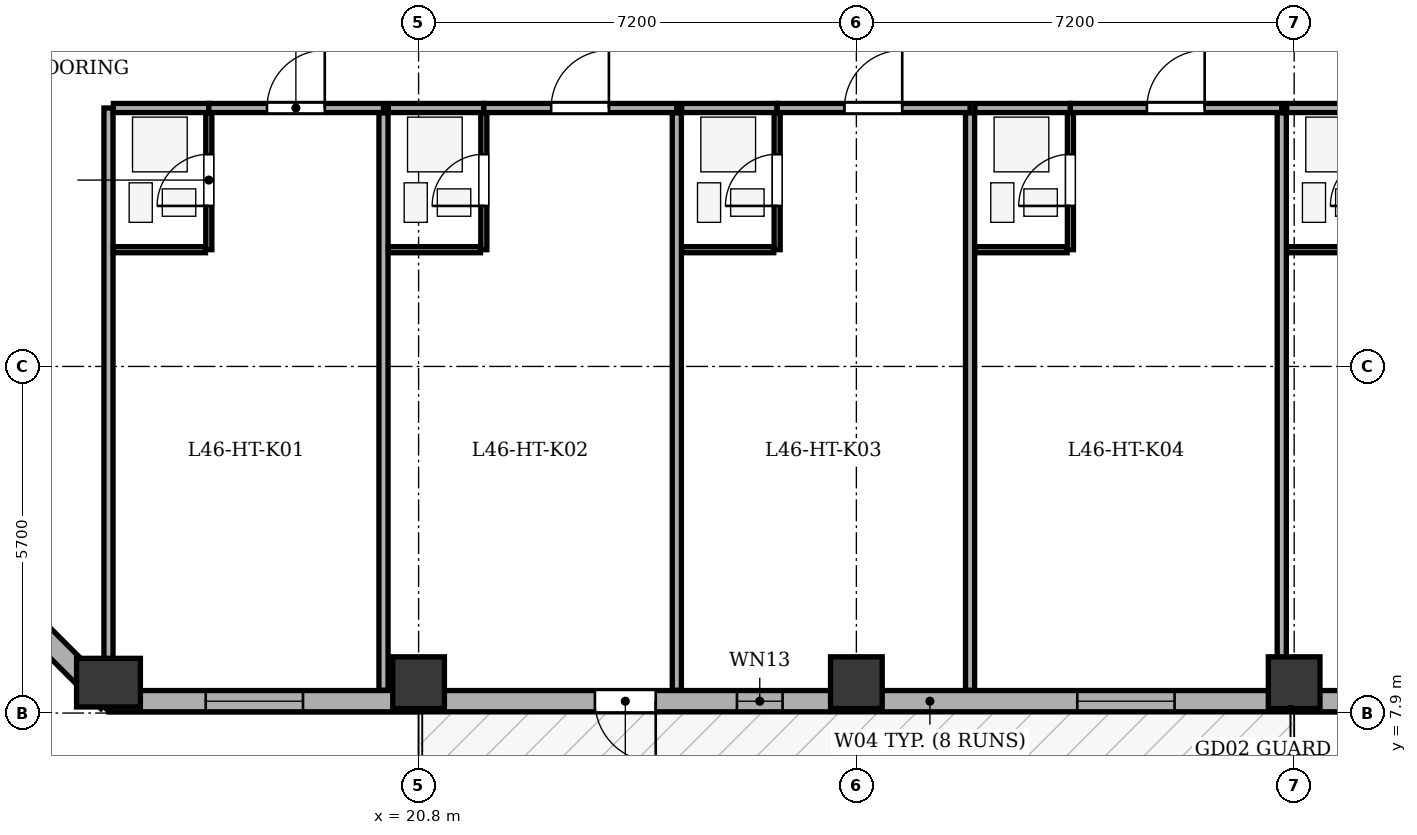
"""IFC4 building model, lengths in metres.
Left out: names, types, materials, properties, quantities, classifications, styles, units other than length and angle.
Written with IfcOpenShell. Run it as: python <this file> out.ifc"""

import sys

from ifc_helpers import new_model, si_unit, direction, frame, frame_2d, origin, origin_2d, place, context, subcontext, project, spatial, rectangle, extrude, element, fill, save


model = new_model("IFC4")
c1 = context("Model", 3, precision=1e-05, world=origin(), true_north=direction((0.0, 1.0)))
c2 = subcontext(c1, "Body", "Model", "MODEL_VIEW")
j1 = project(units=[si_unit("LENGTHUNIT", "METRE"), si_unit("PLANEANGLEUNIT", "RADIAN")], contexts=[c1])
p1 = place(None, origin())
s1 = spatial("IfcSite", under=j1, at=p1, CompositionType="ELEMENT")
p2 = place(p1, origin())
s2 = spatial("IfcBuilding", under=s1, at=p2, CompositionType="ELEMENT")
p3 = place(p2, frame((0.0, 0.0, 179.8)))
s3 = spatial("IfcBuildingStorey", under=s2, at=p3, CompositionType="ELEMENT", Elevation=179.8)
p4 = place(p3, frame((15.7, 8.4, 0.0), z_axis=(0.0, 0.0, 1.0), x_axis=(1.0, 0.0, 0.0)))
e1 = element("IfcColumn", 1, at=p4, inside=s3, PredefinedType="COLUMN", context=c2, shape_type="SweptSolid", body=[
    extrude(rectangle(XDim=0.8, YDim=1.05, at=origin_2d()), origin(), (0.0, 0.0, 1.0), 3.5),
])
for number, where, z_axis, x_axis in (
    (2, (20.8, 8.4, 0.0), (0.0, 0.0, 1.0), (1.0, 0.0, 0.0)),
    (3, (28.0, 8.4, 0.0), (0.0, 0.0, 1.0), (1.0, 0.0, 0.0)),
    (4, (35.2, 8.4, 0.0), (0.0, 0.0, 1.0), (1.0, 0.0, 0.0)),
):
    element("IfcColumn", number, at=place(p3, frame(where, z_axis=z_axis, x_axis=x_axis)), inside=s3, PredefinedType="COLUMN", context=c2, shape_type="SweptSolid", body=[
        extrude(rectangle(XDim=0.85, YDim=0.85, at=origin_2d()), origin(), (0.0, 0.0, 1.0), 3.5),
    ])
p5 = place(p3, frame((50.7, 8.095, 0.0), z_axis=(0.0, 0.0, 1.0), x_axis=(-1.0, 0.0, 0.0)))
e5 = element("IfcWall", 5, at=p5, inside=s3, PredefinedType="STANDARD", context=c2, shape_type="SweptSolid", body=[
    extrude(rectangle(XDim=35.0, YDim=0.35, at=frame_2d((17.5, 0.0))), origin(), (0.0, 0.0, 1.0), 2.435),
])
p6 = place(p5, frame((26.0, 0.0, 0.0)))
e6 = element("IfcOpeningElement", 6, at=p6, cuts=e5, PredefinedType="OPENING", context=c2, shape_type="SweptSolid", body=[
    extrude(rectangle(XDim=1.0, YDim=2.02, at=frame_2d((0.5, 1.01))), frame((0.0, 0.185, 0.0), z_axis=(0.0, -1.0, 0.0), x_axis=(1.0, 0.0, 0.0)), (0.0, 0.0, 1.0), 0.37),
])
p7 = place(p5, frame((1.763, 0.0, 0.75)))
e7 = element("IfcOpeningElement", 7, at=p7, cuts=e5, PredefinedType="OPENING", context=c2, shape_type="SweptSolid", body=[
    extrude(rectangle(XDim=1.6, YDim=1.565, at=frame_2d((0.8, 0.782))), frame((0.0, 0.185, 0.0), z_axis=(0.0, -1.0, 0.0), x_axis=(1.0, 0.0, 0.0)), (0.0, 0.0, 1.0), 0.37),
])
p8 = place(p5, frame((7.564, 0.0, 0.75)))
e8 = element("IfcOpeningElement", 8, at=p8, cuts=e5, PredefinedType="OPENING", context=c2, shape_type="SweptSolid", body=[
    extrude(rectangle(XDim=1.6, YDim=1.565, at=frame_2d((0.8, 0.782))), frame((0.0, 0.185, 0.0), z_axis=(0.0, -1.0, 0.0), x_axis=(1.0, 0.0, 0.0)), (0.0, 0.0, 1.0), 0.37),
])
p9 = place(p5, frame((12.001, 0.0, 0.75)))
e9 = element("IfcOpeningElement", 9, at=p9, cuts=e5, PredefinedType="OPENING", context=c2, shape_type="SweptSolid", body=[
    extrude(rectangle(XDim=1.6, YDim=1.565, at=frame_2d((0.8, 0.782))), frame((0.0, 0.185, 0.0), z_axis=(0.0, -1.0, 0.0), x_axis=(1.0, 0.0, 0.0)), (0.0, 0.0, 1.0), 0.37),
])
p10 = place(p5, frame((17.467, 0.0, 0.75)))
e10 = element("IfcOpeningElement", 10, at=p10, cuts=e5, PredefinedType="OPENING", context=c2, shape_type="SweptSolid", body=[
    extrude(rectangle(XDim=1.6, YDim=1.565, at=frame_2d((0.8, 0.782))), frame((0.0, 0.185, 0.0), z_axis=(0.0, -1.0, 0.0), x_axis=(1.0, 0.0, 0.0)), (0.0, 0.0, 1.0), 0.37),
])
p11 = place(p5, frame((31.801, 0.0, 0.75)))
e11 = element("IfcOpeningElement", 11, at=p11, cuts=e5, PredefinedType="OPENING", context=c2, shape_type="SweptSolid", body=[
    extrude(rectangle(XDim=1.6, YDim=1.565, at=frame_2d((0.8, 0.782))), frame((0.0, 0.185, 0.0), z_axis=(0.0, -1.0, 0.0), x_axis=(1.0, 0.0, 0.0)), (0.0, 0.0, 1.0), 0.37),
])
p12 = place(p5, frame((23.914, 0.0, 0.75)))
e12 = element("IfcOpeningElement", 12, at=p12, cuts=e5, PredefinedType="OPENING", context=c2, shape_type="SweptSolid", body=[
    extrude(rectangle(XDim=0.75, YDim=1.45, at=frame_2d((0.375, 0.725))), frame((0.0, 0.185, 0.0), z_axis=(0.0, -1.0, 0.0), x_axis=(1.0, 0.0, 0.0)), (0.0, 0.0, 1.0), 0.37),
])
p13 = place(p3, frame((15.7, 8.095, 0.0), z_axis=(0.0, 0.0, 1.0), x_axis=(-0.707106781187, 0.707106781187, 0.0)))
e13 = element("IfcWall", 13, at=p13, inside=s3, PredefinedType="STANDARD", context=c2, shape_type="SweptSolid", body=[
    extrude(rectangle(XDim=6.795, YDim=0.35, at=frame_2d((3.397, 0.0))), origin(), (0.0, 0.0, 1.0), 2.435),
])
p14 = place(p13, frame((2.698, 0.0, 0.75)))
e14 = element("IfcOpeningElement", 14, at=p14, cuts=e13, PredefinedType="OPENING", context=c2, shape_type="SweptSolid", body=[
    extrude(rectangle(XDim=1.4, YDim=1.565, at=frame_2d((0.7, 0.782))), frame((0.0, 0.185, 0.0), z_axis=(0.0, -1.0, 0.0), x_axis=(1.0, 0.0, 0.0)), (0.0, 0.0, 1.0), 0.37),
])
p15 = place(p3, frame((15.7, 8.275, 0.0), z_axis=(0.0, 0.0, 1.0), x_axis=(0.0, 1.0, 0.0)))
e15 = element("IfcWall", 15, at=p15, inside=s3, PredefinedType="PARTITIONING", context=c2, shape_type="SweptSolid", body=[
    extrude(rectangle(XDim=9.575, YDim=0.15, at=frame_2d((4.788, 0.0))), origin(), (0.0, 0.0, 1.0), 3.05),
])
p16 = place(p3, frame((15.78, 17.85, 0.0), z_axis=(0.0, 0.0, 1.0), x_axis=(1.0, 0.0, 0.0)))
e16 = element("IfcWall", 16, at=p16, inside=s3, PredefinedType="PARTITIONING", context=c2, shape_type="SweptSolid", body=[
    extrude(rectangle(XDim=1.57, YDim=0.15, at=frame_2d((0.785, 0.0))), origin(), (0.0, 0.0, 1.0), 3.05),
])
p17 = place(p3, frame((17.35, 17.85, 0.0), z_axis=(0.0, 0.0, 1.0), x_axis=(1.0, 0.0, 0.0)))
e17 = element("IfcWall", 17, at=p17, inside=s3, PredefinedType="PARTITIONING", context=c2, shape_type="SweptSolid", body=[
    extrude(rectangle(XDim=2.873, YDim=0.15, at=frame_2d((1.437, 0.0))), origin(), (0.0, 0.0, 1.0), 3.05),
])
p18 = place(p17, frame((0.957, 0.0, 0.0)))
e18 = element("IfcOpeningElement", 18, at=p18, cuts=e17, PredefinedType="OPENING", context=c2, shape_type="SweptSolid", body=[
    extrude(rectangle(XDim=0.95, YDim=2.1, at=frame_2d((0.475, 1.05))), frame((0.0, 0.085, 0.0), z_axis=(0.0, -1.0, 0.0), x_axis=(1.0, 0.0, 0.0)), (0.0, 0.0, 1.0), 0.17),
])
p19 = place(p3, frame((17.35, 15.52, 0.0), z_axis=(0.0, 0.0, 1.0), x_axis=(0.0, 1.0, 0.0)))
e19 = element("IfcWall", 19, at=p19, inside=s3, PredefinedType="PARTITIONING", context=c2, shape_type="SweptSolid", body=[
    extrude(rectangle(XDim=2.25, YDim=0.1, at=frame_2d((1.125, 0.0))), origin(), (0.0, 0.0, 1.0), 3.05),
])
p20 = place(p19, frame((0.72, 0.0, 0.0)))
e20 = element("IfcOpeningElement", 20, at=p20, cuts=e19, PredefinedType="OPENING", context=c2, shape_type="SweptSolid", body=[
    extrude(rectangle(XDim=0.85, YDim=2.05, at=frame_2d((0.425, 1.025))), frame((0.0, 0.06, 0.0), z_axis=(0.0, -1.0, 0.0), x_axis=(1.0, 0.0, 0.0)), (0.0, 0.0, 1.0), 0.12),
])
p21 = place(p3, frame((15.78, 15.52, 0.0), z_axis=(0.0, 0.0, 1.0), x_axis=(1.0, 0.0, 0.0)))
e21 = element("IfcWall", 21, at=p21, inside=s3, PredefinedType="PARTITIONING", context=c2, shape_type="SweptSolid", body=[
    extrude(rectangle(XDim=1.515, YDim=0.1, at=frame_2d((0.757, 0.0))), origin(), (0.0, 0.0, 1.0), 3.05),
])
p22 = place(p3, frame((20.223, 8.275, 0.0), z_axis=(0.0, 0.0, 1.0), x_axis=(0.0, 1.0, 0.0)))
e22 = element("IfcWall", 22, at=p22, inside=s3, PredefinedType="PARTITIONING", context=c2, shape_type="SweptSolid", body=[
    extrude(rectangle(XDim=9.495, YDim=0.15, at=frame_2d((4.748, 0.0))), origin(), (0.0, 0.0, 1.0), 3.05),
])
p23 = place(p3, frame((20.303, 17.85, 0.0), z_axis=(0.0, 0.0, 1.0), x_axis=(1.0, 0.0, 0.0)))
e23 = element("IfcWall", 23, at=p23, inside=s3, PredefinedType="PARTITIONING", context=c2, shape_type="SweptSolid", body=[
    extrude(rectangle(XDim=1.57, YDim=0.15, at=frame_2d((0.785, 0.0))), origin(), (0.0, 0.0, 1.0), 3.05),
])
p24 = place(p3, frame((21.873, 17.85, 0.0), z_axis=(0.0, 0.0, 1.0), x_axis=(1.0, 0.0, 0.0)))
e24 = element("IfcWall", 24, at=p24, inside=s3, PredefinedType="PARTITIONING", context=c2, shape_type="SweptSolid", body=[
    extrude(rectangle(XDim=3.174, YDim=0.15, at=frame_2d((1.587, 0.0))), origin(), (0.0, 0.0, 1.0), 3.05),
])
p25 = place(p24, frame((1.107, 0.0, 0.0)))
e25 = element("IfcOpeningElement", 25, at=p25, cuts=e24, PredefinedType="OPENING", context=c2, shape_type="SweptSolid", body=[
    extrude(rectangle(XDim=0.95, YDim=2.1, at=frame_2d((0.475, 1.05))), frame((0.0, 0.085, 0.0), z_axis=(0.0, -1.0, 0.0), x_axis=(1.0, 0.0, 0.0)), (0.0, 0.0, 1.0), 0.17),
])
p26 = place(p3, frame((21.873, 15.52, 0.0), z_axis=(0.0, 0.0, 1.0), x_axis=(0.0, 1.0, 0.0)))
e26 = element("IfcWall", 26, at=p26, inside=s3, PredefinedType="PARTITIONING", context=c2, shape_type="SweptSolid", body=[
    extrude(rectangle(XDim=2.25, YDim=0.1, at=frame_2d((1.125, 0.0))), origin(), (0.0, 0.0, 1.0), 3.05),
])
p27 = place(p26, frame((0.72, 0.0, 0.0)))
e27 = element("IfcOpeningElement", 27, at=p27, cuts=e26, PredefinedType="OPENING", context=c2, shape_type="SweptSolid", body=[
    extrude(rectangle(XDim=0.85, YDim=2.05, at=frame_2d((0.425, 1.025))), frame((0.0, 0.06, 0.0), z_axis=(0.0, -1.0, 0.0), x_axis=(1.0, 0.0, 0.0)), (0.0, 0.0, 1.0), 0.12),
])
p28 = place(p3, frame((20.303, 15.52, 0.0), z_axis=(0.0, 0.0, 1.0), x_axis=(1.0, 0.0, 0.0)))
e28 = element("IfcWall", 28, at=p28, inside=s3, PredefinedType="PARTITIONING", context=c2, shape_type="SweptSolid", body=[
    extrude(rectangle(XDim=1.515, YDim=0.1, at=frame_2d((0.758, 0.0))), origin(), (0.0, 0.0, 1.0), 3.05),
])
p29 = place(p3, frame((25.047, 8.275, 0.0), z_axis=(0.0, 0.0, 1.0), x_axis=(0.0, 1.0, 0.0)))
e29 = element("IfcWall", 29, at=p29, inside=s3, PredefinedType="PARTITIONING", context=c2, shape_type="SweptSolid", body=[
    extrude(rectangle(XDim=9.495, YDim=0.15, at=frame_2d((4.748, 0.0))), origin(), (0.0, 0.0, 1.0), 3.05),
])
p30 = place(p3, frame((25.127, 17.85, 0.0), z_axis=(0.0, 0.0, 1.0), x_axis=(1.0, 0.0, 0.0)))
e30 = element("IfcWall", 30, at=p30, inside=s3, PredefinedType="PARTITIONING", context=c2, shape_type="SweptSolid", body=[
    extrude(rectangle(XDim=1.57, YDim=0.15, at=frame_2d((0.785, 0.0))), origin(), (0.0, 0.0, 1.0), 3.05),
])
p31 = place(p3, frame((26.697, 17.85, 0.0), z_axis=(0.0, 0.0, 1.0), x_axis=(1.0, 0.0, 0.0)))
e31 = element("IfcWall", 31, at=p31, inside=s3, PredefinedType="PARTITIONING", context=c2, shape_type="SweptSolid", body=[
    extrude(rectangle(XDim=3.173, YDim=0.15, at=frame_2d((1.586, 0.0))), origin(), (0.0, 0.0, 1.0), 3.05),
])
p32 = place(p31, frame((1.107, 0.0, 0.0)))
e32 = element("IfcOpeningElement", 32, at=p32, cuts=e31, PredefinedType="OPENING", context=c2, shape_type="SweptSolid", body=[
    extrude(rectangle(XDim=0.95, YDim=2.1, at=frame_2d((0.475, 1.05))), frame((0.0, 0.085, 0.0), z_axis=(0.0, -1.0, 0.0), x_axis=(1.0, 0.0, 0.0)), (0.0, 0.0, 1.0), 0.17),
])
p33 = place(p3, frame((26.697, 15.52, 0.0), z_axis=(0.0, 0.0, 1.0), x_axis=(0.0, 1.0, 0.0)))
e33 = element("IfcWall", 33, at=p33, inside=s3, PredefinedType="PARTITIONING", context=c2, shape_type="SweptSolid", body=[
    extrude(rectangle(XDim=2.25, YDim=0.1, at=frame_2d((1.125, 0.0))), origin(), (0.0, 0.0, 1.0), 3.05),
])
p34 = place(p33, frame((0.72, 0.0, 0.0)))
e34 = element("IfcOpeningElement", 34, at=p34, cuts=e33, PredefinedType="OPENING", context=c2, shape_type="SweptSolid", body=[
    extrude(rectangle(XDim=0.85, YDim=2.05, at=frame_2d((0.425, 1.025))), frame((0.0, 0.06, 0.0), z_axis=(0.0, -1.0, 0.0), x_axis=(1.0, 0.0, 0.0)), (0.0, 0.0, 1.0), 0.12),
])
p35 = place(p3, frame((25.127, 15.52, 0.0), z_axis=(0.0, 0.0, 1.0), x_axis=(1.0, 0.0, 0.0)))
e35 = element("IfcWall", 35, at=p35, inside=s3, PredefinedType="PARTITIONING", context=c2, shape_type="SweptSolid", body=[
    extrude(rectangle(XDim=1.515, YDim=0.1, at=frame_2d((0.758, 0.0))), origin(), (0.0, 0.0, 1.0), 3.05),
])
p36 = place(p3, frame((29.87, 8.275, 0.0), z_axis=(0.0, 0.0, 1.0), x_axis=(0.0, 1.0, 0.0)))
e36 = element("IfcWall", 36, at=p36, inside=s3, PredefinedType="PARTITIONING", context=c2, shape_type="SweptSolid", body=[
    extrude(rectangle(XDim=9.495, YDim=0.15, at=frame_2d((4.748, 0.0))), origin(), (0.0, 0.0, 1.0), 2.485),
])
p37 = place(p3, frame((29.95, 17.85, 0.0), z_axis=(0.0, 0.0, 1.0), x_axis=(1.0, 0.0, 0.0)))
e37 = element("IfcWall", 37, at=p37, inside=s3, PredefinedType="PARTITIONING", context=c2, shape_type="SweptSolid", body=[
    extrude(rectangle(XDim=1.57, YDim=0.15, at=frame_2d((0.785, 0.0))), origin(), (0.0, 0.0, 1.0), 3.05),
])
p38 = place(p3, frame((31.52, 17.85, 0.0), z_axis=(0.0, 0.0, 1.0), x_axis=(1.0, 0.0, 0.0)))
e38 = element("IfcWall", 38, at=p38, inside=s3, PredefinedType="PARTITIONING", context=c2, shape_type="SweptSolid", body=[
    extrude(rectangle(XDim=3.476, YDim=0.15, at=frame_2d((1.738, 0.0))), origin(), (0.0, 0.0, 1.0), 3.05),
])
p39 = place(p38, frame((1.258, 0.0, 0.0)))
e39 = element("IfcOpeningElement", 39, at=p39, cuts=e38, PredefinedType="OPENING", context=c2, shape_type="SweptSolid", body=[
    extrude(rectangle(XDim=0.95, YDim=2.1, at=frame_2d((0.475, 1.05))), frame((0.0, 0.085, 0.0), z_axis=(0.0, -1.0, 0.0), x_axis=(1.0, 0.0, 0.0)), (0.0, 0.0, 1.0), 0.17),
])
p40 = place(p3, frame((31.52, 15.52, 0.0), z_axis=(0.0, 0.0, 1.0), x_axis=(0.0, 1.0, 0.0)))
e40 = element("IfcWall", 40, at=p40, inside=s3, PredefinedType="PARTITIONING", context=c2, shape_type="SweptSolid", body=[
    extrude(rectangle(XDim=2.25, YDim=0.1, at=frame_2d((1.125, 0.0))), origin(), (0.0, 0.0, 1.0), 3.05),
])
p41 = place(p40, frame((0.72, 0.0, 0.0)))
e41 = element("IfcOpeningElement", 41, at=p41, cuts=e40, PredefinedType="OPENING", context=c2, shape_type="SweptSolid", body=[
    extrude(rectangle(XDim=0.85, YDim=2.05, at=frame_2d((0.425, 1.025))), frame((0.0, 0.06, 0.0), z_axis=(0.0, -1.0, 0.0), x_axis=(1.0, 0.0, 0.0)), (0.0, 0.0, 1.0), 0.12),
])
p42 = place(p3, frame((29.95, 15.52, 0.0), z_axis=(0.0, 0.0, 1.0), x_axis=(1.0, 0.0, 0.0)))
e42 = element("IfcWall", 42, at=p42, inside=s3, PredefinedType="PARTITIONING", context=c2, shape_type="SweptSolid", body=[
    extrude(rectangle(XDim=1.515, YDim=0.1, at=frame_2d((0.758, 0.0))), origin(), (0.0, 0.0, 1.0), 3.05),
])
p43 = place(p3, frame((34.996, 8.275, 0.0), z_axis=(0.0, 0.0, 1.0), x_axis=(0.0, 1.0, 0.0)))
e43 = element("IfcWall", 43, at=p43, inside=s3, PredefinedType="PARTITIONING", context=c2, shape_type="SweptSolid", body=[
    extrude(rectangle(XDim=9.495, YDim=0.15, at=frame_2d((4.748, 0.0))), origin(), (0.0, 0.0, 1.0), 2.235),
])
p44 = place(p3, frame((35.076, 17.85, 0.0), z_axis=(0.0, 0.0, 1.0), x_axis=(1.0, 0.0, 0.0)))
e44 = element("IfcWall", 44, at=p44, inside=s3, PredefinedType="PARTITIONING", context=c2, shape_type="SweptSolid", body=[
    extrude(rectangle(XDim=1.57, YDim=0.15, at=frame_2d((0.785, 0.0))), origin(), (0.0, 0.0, 1.0), 3.05),
])
p45 = place(p3, frame((35.076, 15.52, 0.0), z_axis=(0.0, 0.0, 1.0), x_axis=(1.0, 0.0, 0.0)))
e45 = element("IfcWall", 45, at=p45, inside=s3, PredefinedType="PARTITIONING", context=c2, shape_type="SweptSolid", body=[
    extrude(rectangle(XDim=1.515, YDim=0.1, at=frame_2d((0.758, 0.0))), origin(), (0.0, 0.0, 1.0), 3.05),
])
p46 = place(p6, origin())
e46 = element("IfcDoor", 46, at=p46, inside=s3, OperationType="SINGLE_SWING_LEFT", PredefinedType="DOOR", context=c2, shape_type="SweptSolid", body=[
    extrude(rectangle(XDim=1.0, YDim=2.02, at=frame_2d((0.5, 1.01))), frame((0.0, 0.025, 0.0), z_axis=(0.0, -1.0, 0.0), x_axis=(1.0, 0.0, 0.0)), (0.0, 0.0, 1.0), 0.05),
])
fill(e6, e46)
p47 = place(p10, origin())
e47 = element("IfcWindow", 47, at=p47, inside=s3, PartitioningType="SINGLE_PANEL", PredefinedType="WINDOW", context=c2, shape_type="SweptSolid", body=[
    extrude(rectangle(XDim=1.6, YDim=1.565, at=frame_2d((0.8, 0.782))), frame((0.0, -0.01, 0.0), z_axis=(0.0, -1.0, 0.0), x_axis=(1.0, 0.0, 0.0)), (0.0, 0.0, 1.0), 0.06),
])
fill(e10, e47)
p48 = place(p11, origin())
e48 = element("IfcWindow", 48, at=p48, inside=s3, PartitioningType="SINGLE_PANEL", PredefinedType="WINDOW", context=c2, shape_type="SweptSolid", body=[
    extrude(rectangle(XDim=1.6, YDim=1.565, at=frame_2d((0.8, 0.782))), frame((0.0, -0.01, 0.0), z_axis=(0.0, -1.0, 0.0), x_axis=(1.0, 0.0, 0.0)), (0.0, 0.0, 1.0), 0.06),
])
fill(e11, e48)
p49 = place(p12, origin())
e49 = element("IfcWindow", 49, at=p49, inside=s3, PartitioningType="SINGLE_PANEL", PredefinedType="WINDOW", context=c2, shape_type="SweptSolid", body=[
    extrude(rectangle(XDim=0.75, YDim=1.45, at=frame_2d((0.375, 0.725))), frame((0.0, -0.01, 0.0), z_axis=(0.0, -1.0, 0.0), x_axis=(1.0, 0.0, 0.0)), (0.0, 0.0, 1.0), 0.06),
])
fill(e12, e49)
p50 = place(p20, origin())
e50 = element("IfcDoor", 50, at=p50, inside=s3, OperationType="SINGLE_SWING_LEFT", PredefinedType="DOOR", context=c2, shape_type="SweptSolid", body=[
    extrude(rectangle(XDim=0.85, YDim=2.05, at=frame_2d((0.425, 1.025))), frame((0.0, 0.025, 0.0), z_axis=(0.0, -1.0, 0.0), x_axis=(1.0, 0.0, 0.0)), (0.0, 0.0, 1.0), 0.05),
])
fill(e20, e50)
p51 = place(p18, origin())
e51 = element("IfcDoor", 51, at=p51, inside=s3, OperationType="SINGLE_SWING_RIGHT", PredefinedType="DOOR", context=c2, shape_type="SweptSolid", body=[
    extrude(rectangle(XDim=0.95, YDim=2.1, at=frame_2d((0.475, 1.05))), frame((0.0, 0.025, 0.0), z_axis=(0.0, -1.0, 0.0), x_axis=(1.0, 0.0, 0.0)), (0.0, 0.0, 1.0), 0.05),
])
fill(e18, e51)
p52 = place(p27, origin())
e52 = element("IfcDoor", 52, at=p52, inside=s3, OperationType="SINGLE_SWING_LEFT", PredefinedType="DOOR", context=c2, shape_type="SweptSolid", body=[
    extrude(rectangle(XDim=0.85, YDim=2.05, at=frame_2d((0.425, 1.025))), frame((0.0, 0.025, 0.0), z_axis=(0.0, -1.0, 0.0), x_axis=(1.0, 0.0, 0.0)), (0.0, 0.0, 1.0), 0.05),
])
fill(e27, e52)
p53 = place(p25, origin())
e53 = element("IfcDoor", 53, at=p53, inside=s3, OperationType="SINGLE_SWING_RIGHT", PredefinedType="DOOR", context=c2, shape_type="SweptSolid", body=[
    extrude(rectangle(XDim=0.95, YDim=2.1, at=frame_2d((0.475, 1.05))), frame((0.0, 0.025, 0.0), z_axis=(0.0, -1.0, 0.0), x_axis=(1.0, 0.0, 0.0)), (0.0, 0.0, 1.0), 0.05),
])
fill(e25, e53)
p54 = place(p34, origin())
e54 = element("IfcDoor", 54, at=p54, inside=s3, OperationType="SINGLE_SWING_LEFT", PredefinedType="DOOR", context=c2, shape_type="SweptSolid", body=[
    extrude(rectangle(XDim=0.85, YDim=2.05, at=frame_2d((0.425, 1.025))), frame((0.0, 0.025, 0.0), z_axis=(0.0, -1.0, 0.0), x_axis=(1.0, 0.0, 0.0)), (0.0, 0.0, 1.0), 0.05),
])
fill(e34, e54)
p55 = place(p32, origin())
e55 = element("IfcDoor", 55, at=p55, inside=s3, OperationType="SINGLE_SWING_RIGHT", PredefinedType="DOOR", context=c2, shape_type="SweptSolid", body=[
    extrude(rectangle(XDim=0.95, YDim=2.1, at=frame_2d((0.475, 1.05))), frame((0.0, 0.025, 0.0), z_axis=(0.0, -1.0, 0.0), x_axis=(1.0, 0.0, 0.0)), (0.0, 0.0, 1.0), 0.05),
])
fill(e32, e55)
p56 = place(p41, origin())
e56 = element("IfcDoor", 56, at=p56, inside=s3, OperationType="SINGLE_SWING_LEFT", PredefinedType="DOOR", context=c2, shape_type="SweptSolid", body=[
    extrude(rectangle(XDim=0.85, YDim=2.05, at=frame_2d((0.425, 1.025))), frame((0.0, 0.025, 0.0), z_axis=(0.0, -1.0, 0.0), x_axis=(1.0, 0.0, 0.0)), (0.0, 0.0, 1.0), 0.05),
])
fill(e41, e56)
p57 = place(p39, origin())
e57 = element("IfcDoor", 57, at=p57, inside=s3, OperationType="SINGLE_SWING_RIGHT", PredefinedType="DOOR", context=c2, shape_type="SweptSolid", body=[
    extrude(rectangle(XDim=0.95, YDim=2.1, at=frame_2d((0.475, 1.05))), frame((0.0, 0.025, 0.0), z_axis=(0.0, -1.0, 0.0), x_axis=(1.0, 0.0, 0.0)), (0.0, 0.0, 1.0), 0.05),
])
fill(e39, e57)
save(model, sys.argv[1])
